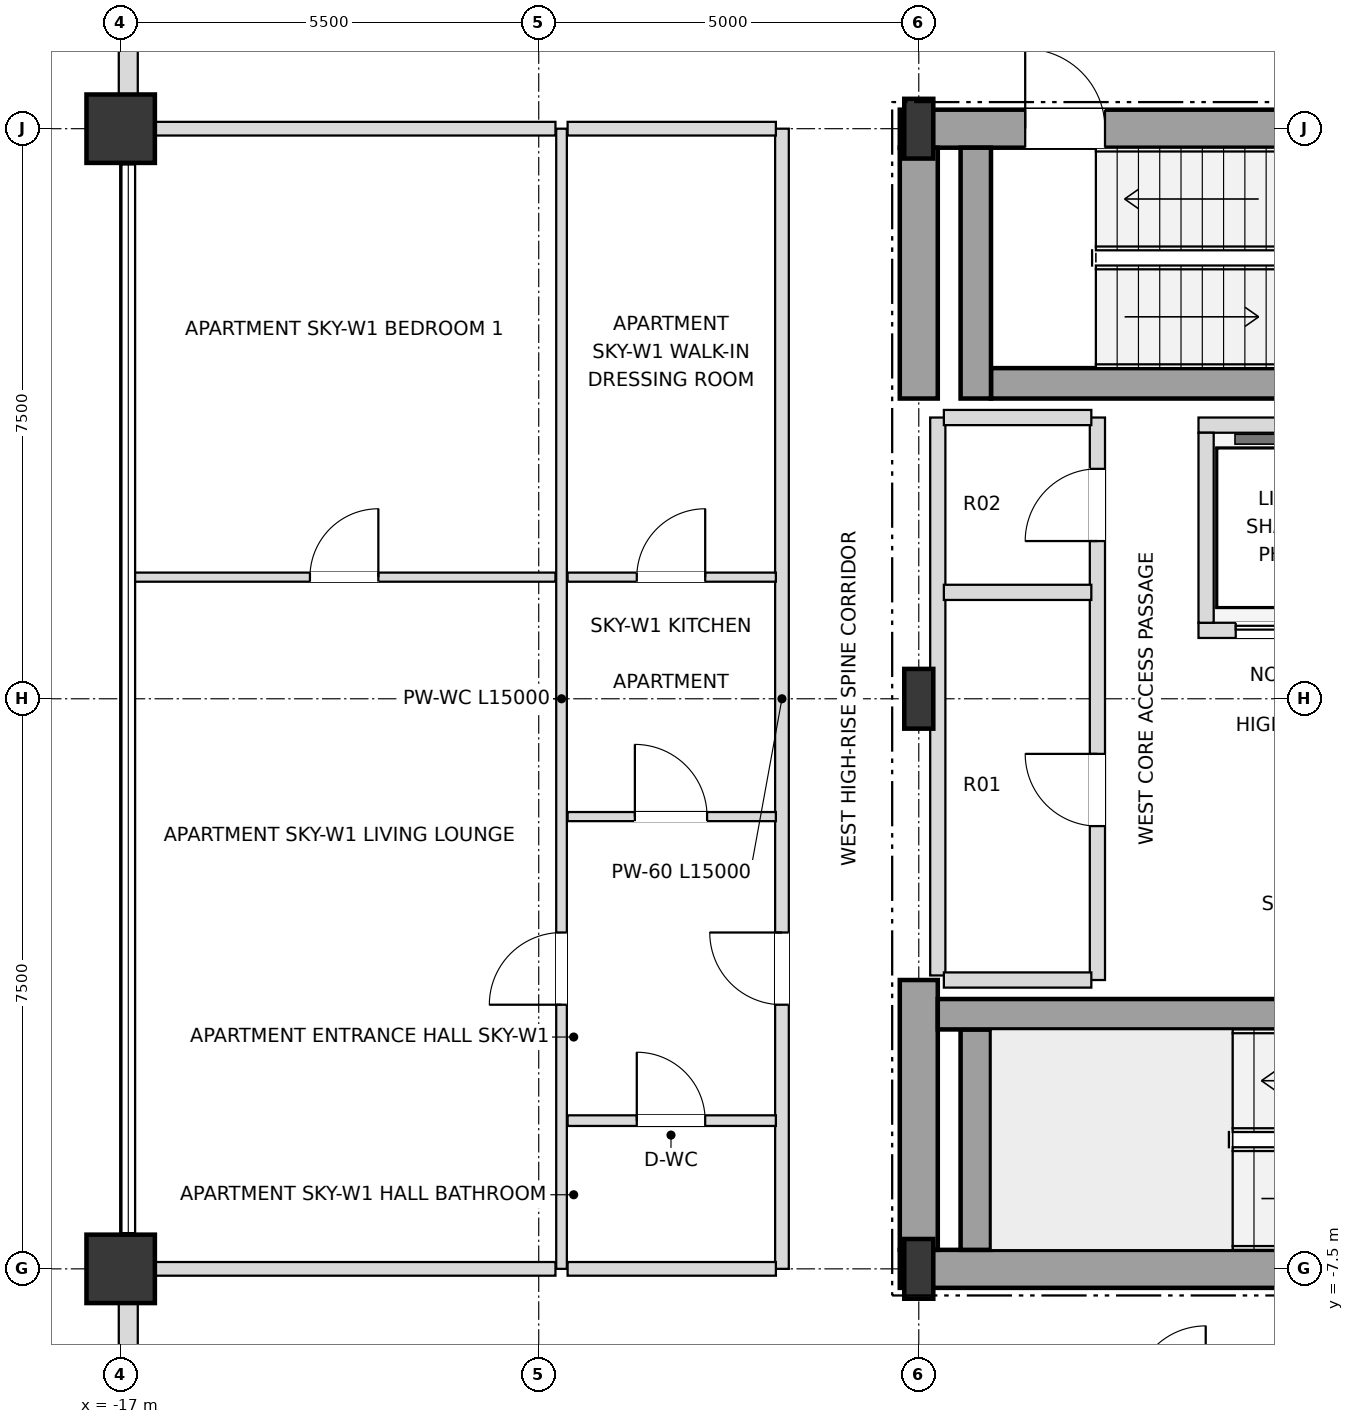
"""IFC4 building model, lengths in metres.
Left out: names, types, materials, properties, quantities, classifications, styles, units other than length and angle.
Written with IfcOpenShell. Run it as: python <this file> out.ifc"""

import sys

from ifc_helpers import new_model, si_unit, direction, frame, frame_2d, origin, origin_2d, place, context, subcontext, project, spatial, rectangle, i_section, extrude, element, fill, save


model = new_model("IFC4")
c1 = context("Model", 3, precision=1e-05, world=origin(), true_north=direction((0.0, 1.0)))
c2 = subcontext(c1, "Body", "Model", "MODEL_VIEW")
j1 = project(units=[si_unit("LENGTHUNIT", "METRE"), si_unit("PLANEANGLEUNIT", "RADIAN")], contexts=[c1])
p1 = place(None, origin())
s1 = spatial("IfcSite", under=j1, at=p1, CompositionType="ELEMENT")
p2 = place(p1, origin())
s2 = spatial("IfcBuilding", under=s1, at=p2, CompositionType="ELEMENT")
p3 = place(p2, frame((0.0, 0.0, 222.3)))
s3 = spatial("IfcBuildingStorey", under=s2, at=p3, CompositionType="ELEMENT", Elevation=222.3)
for number, where, z_axis, x_axis in (
    (1, (-6.5, -7.5, 0.0), (0.0, 0.0, 1.0), (1.0, 0.0, 0.0)),
    (2, (-6.5, 0.0, 0.0), (0.0, 0.0, 1.0), (1.0, 0.0, 0.0)),
    (3, (-6.5, 7.5, 0.0), (0.0, 0.0, 1.0), (1.0, 0.0, 0.0)),
):
    element("IfcColumn", number, at=place(p3, frame(where, z_axis=z_axis, x_axis=x_axis)), inside=s3, PredefinedType="COLUMN", context=c2, shape_type="SweptSolid", body=[
        extrude(i_section(OverallWidth=0.382, OverallDepth=0.786, WebThickness=0.02, FlangeThickness=0.033, at=origin_2d()), origin(), (0.0, 0.0, 1.0), 3.6),
    ])
for number, where, z_axis, x_axis in (
    (4, (-17.0, 7.5, 0.0), (0.0, 0.0, 1.0), (1.0, 0.0, 0.0)),
    (5, (-17.0, -7.5, 0.0), (0.0, 0.0, 1.0), (1.0, 0.0, 0.0)),
):
    element("IfcColumn", number, at=place(p3, frame(where, z_axis=z_axis, x_axis=x_axis)), inside=s3, PredefinedType="USERDEFINED", context=c2, shape_type="SweptSolid", body=[
        extrude(rectangle(XDim=0.9, YDim=0.9, at=origin_2d()), origin(), (0.0, 0.0, 1.0), 3.6),
    ])
p4 = place(p3, frame((-16.9, 12.555, 0.0), z_axis=(0.0, 0.0, 1.0), x_axis=(0.0, -1.0, 0.0)))
e6 = element("IfcWall", 6, at=p4, inside=s3, PredefinedType="SOLIDWALL", context=c2, shape_type="SweptSolid", body=[
    extrude(rectangle(XDim=4.61, YDim=0.25, at=frame_2d((2.305, 0.0))), origin(), (0.0, 0.0, 1.0), 2.748),
])
p5 = place(p4, frame((1.405, 0.0, 0.72)))
e7 = element("IfcOpeningElement", 7, at=p5, cuts=e6, PredefinedType="OPENING", context=c2, shape_type="SweptSolid", body=[
    extrude(rectangle(XDim=1.8, YDim=1.68, at=frame_2d((0.9, 0.84))), frame((0.0, 0.135, 0.0), z_axis=(0.0, -1.0, 0.0), x_axis=(1.0, 0.0, 0.0)), (0.0, 0.0, 1.0), 0.27),
])
p6 = place(p3, frame((-16.9, -7.945, 0.0), z_axis=(0.0, 0.0, 1.0), x_axis=(0.0, -1.0, 0.0)))
e8 = element("IfcWall", 8, at=p6, inside=s3, PredefinedType="SOLIDWALL", context=c2, shape_type="SweptSolid", body=[
    extrude(rectangle(XDim=4.61, YDim=0.25, at=frame_2d((2.305, 0.0))), origin(), (0.0, 0.0, 1.0), 2.748),
])
p7 = place(p6, frame((1.405, 0.0, 0.72)))
e9 = element("IfcOpeningElement", 9, at=p7, cuts=e8, PredefinedType="OPENING", context=c2, shape_type="SweptSolid", body=[
    extrude(rectangle(XDim=1.8, YDim=1.68, at=frame_2d((0.9, 0.84))), frame((0.0, 0.135, 0.0), z_axis=(0.0, -1.0, 0.0), x_axis=(1.0, 0.0, 0.0)), (0.0, 0.0, 1.0), 0.27),
])
p8 = place(p3, frame((-6.75, -7.5, 0.0), z_axis=(0.0, 0.0, 1.0), x_axis=(1.0, 0.0, 0.0)))
e10 = element("IfcWall", 10, at=p8, inside=s3, PredefinedType="SHEAR", context=c2, shape_type="SweptSolid", body=[
    extrude(rectangle(XDim=6.75, YDim=0.5, at=frame_2d((3.375, 0.0))), origin(), (0.0, 0.0, 1.0), 3.38),
])
p9 = place(p3, frame((-6.75, 7.5, 0.0), z_axis=(0.0, 0.0, 1.0), x_axis=(1.0, 0.0, 0.0)))
e11 = element("IfcWall", 11, at=p9, inside=s3, PredefinedType="SHEAR", context=c2, shape_type="SweptSolid", body=[
    extrude(rectangle(XDim=6.75, YDim=0.5, at=frame_2d((3.375, 0.0))), origin(), (0.0, 0.0, 1.0), 3.38),
])
p10 = place(p9, frame((1.65, 0.0, 0.0)))
e12 = element("IfcOpeningElement", 12, at=p10, cuts=e11, PredefinedType="OPENING", context=c2, shape_type="SweptSolid", body=[
    extrude(rectangle(XDim=1.05, YDim=2.15, at=frame_2d((0.525, 1.075))), frame((0.0, 0.26, 0.0), z_axis=(0.0, -1.0, 0.0), x_axis=(1.0, 0.0, 0.0)), (0.0, 0.0, 1.0), 0.52),
])
p11 = place(p3, frame((-6.5, -7.25, 0.0), z_axis=(0.0, 0.0, 1.0), x_axis=(0.0, 1.0, 0.0)))
e13 = element("IfcWall", 13, at=p11, inside=s3, PredefinedType="SHEAR", context=c2, shape_type="SweptSolid", body=[
    extrude(rectangle(XDim=3.55, YDim=0.5, at=frame_2d((1.775, 0.0))), origin(), (0.0, 0.0, 1.0), 3.38),
])
p12 = place(p3, frame((-6.5, 3.95, 0.0), z_axis=(0.0, 0.0, 1.0), x_axis=(0.0, 1.0, 0.0)))
e14 = element("IfcWall", 14, at=p12, inside=s3, PredefinedType="SHEAR", context=c2, shape_type="SweptSolid", body=[
    extrude(rectangle(XDim=3.3, YDim=0.5, at=frame_2d((1.65, 0.0))), origin(), (0.0, 0.0, 1.0), 3.38),
])
p13 = place(p3, frame((-5.75, -7.25, 0.0), z_axis=(0.0, 0.0, 1.0), x_axis=(0.0, 1.0, 0.0)))
e15 = element("IfcWall", 15, at=p13, inside=s3, PredefinedType="SHEAR", context=c2, shape_type="SweptSolid", body=[
    extrude(rectangle(XDim=2.9, YDim=0.4, at=frame_2d((1.45, 0.0))), origin(), (0.0, 0.0, 1.0), 3.38),
])
p14 = place(p3, frame((-6.25, -4.15, 0.0), z_axis=(0.0, 0.0, 1.0), x_axis=(1.0, 0.0, 0.0)))
e16 = element("IfcWall", 16, at=p14, inside=s3, PredefinedType="SHEAR", context=c2, shape_type="SweptSolid", body=[
    extrude(rectangle(XDim=7.78, YDim=0.4, at=frame_2d((3.89, 0.0))), origin(), (0.0, 0.0, 1.0), 3.38),
])
p15 = place(p3, frame((-5.55, 4.15, 0.0), z_axis=(0.0, 0.0, 1.0), x_axis=(1.0, 0.0, 0.0)))
e17 = element("IfcWall", 17, at=p15, inside=s3, PredefinedType="SHEAR", context=c2, shape_type="SweptSolid", body=[
    extrude(rectangle(XDim=7.08, YDim=0.4, at=frame_2d((3.54, 0.0))), origin(), (0.0, 0.0, 1.0), 3.38),
])
p16 = place(p3, frame((-5.75, 3.95, 0.0), z_axis=(0.0, 0.0, 1.0), x_axis=(0.0, 1.0, 0.0)))
e18 = element("IfcWall", 18, at=p16, inside=s3, PredefinedType="SHEAR", context=c2, shape_type="SweptSolid", body=[
    extrude(rectangle(XDim=3.3, YDim=0.4, at=frame_2d((1.65, 0.0))), origin(), (0.0, 0.0, 1.0), 3.38),
])
p17 = place(p3, frame((-2.82, 0.9, 0.0), z_axis=(0.0, 0.0, 1.0), x_axis=(1.0, 0.0, 0.0)))
e19 = element("IfcWall", 19, at=p17, inside=s3, PredefinedType="SOLIDWALL", context=c2, shape_type="SweptSolid", body=[
    extrude(rectangle(XDim=5.58, YDim=0.2, at=frame_2d((2.79, 0.0))), origin(), (0.0, 0.0, 1.0), 3.38),
])
p18 = place(p17, frame((0.49, 0.0, 0.0)))
e20 = element("IfcOpeningElement", 20, at=p18, cuts=e19, PredefinedType="OPENING", context=c2, shape_type="SweptSolid", body=[
    extrude(rectangle(XDim=1.1, YDim=2.15, at=frame_2d((0.55, 1.075))), frame((0.0, 0.11, 0.0), z_axis=(0.0, -1.0, 0.0), x_axis=(1.0, 0.0, 0.0)), (0.0, 0.0, 1.0), 0.22),
])
p19 = place(p17, frame((2.17, 0.0, 0.0)))
e21 = element("IfcOpeningElement", 21, at=p19, cuts=e19, PredefinedType="OPENING", context=c2, shape_type="SweptSolid", body=[
    extrude(rectangle(XDim=1.1, YDim=2.15, at=frame_2d((0.55, 1.075))), frame((0.0, 0.11, 0.0), z_axis=(0.0, -1.0, 0.0), x_axis=(1.0, 0.0, 0.0)), (0.0, 0.0, 1.0), 0.22),
])
p20 = place(p17, frame((3.86, 0.0, 0.0)))
e22 = element("IfcOpeningElement", 22, at=p20, cuts=e19, PredefinedType="OPENING", context=c2, shape_type="SweptSolid", body=[
    extrude(rectangle(XDim=1.2, YDim=2.2, at=frame_2d((0.6, 1.1))), frame((0.0, 0.11, 0.0), z_axis=(0.0, -1.0, 0.0), x_axis=(1.0, 0.0, 0.0)), (0.0, 0.0, 1.0), 0.22),
])
p21 = place(p3, frame((-2.82, 3.6, 0.0), z_axis=(0.0, 0.0, 1.0), x_axis=(1.0, 0.0, 0.0)))
e23 = element("IfcWall", 23, at=p21, inside=s3, PredefinedType="SOLIDWALL", context=c2, shape_type="SweptSolid", body=[
    extrude(rectangle(XDim=5.58, YDim=0.2, at=frame_2d((2.79, 0.0))), origin(), (0.0, 0.0, 1.0), 3.38),
])
p22 = place(p3, frame((-2.72, 1.0, 0.0), z_axis=(0.0, 0.0, 1.0), x_axis=(0.0, 1.0, 0.0)))
e24 = element("IfcWall", 24, at=p22, inside=s3, PredefinedType="SOLIDWALL", context=c2, shape_type="SweptSolid", body=[
    extrude(rectangle(XDim=2.5, YDim=0.2, at=frame_2d((1.25, 0.0))), origin(), (0.0, 0.0, 1.0), 3.38),
])
p23 = place(p3, frame((-11.2, -7.5, 0.0), z_axis=(0.0, 0.0, 1.0), x_axis=(0.0, 1.0, 0.0)))
e25 = element("IfcWall", 25, at=p23, inside=s3, PredefinedType="PARTITIONING", context=c2, shape_type="SweptSolid", body=[
    extrude(rectangle(XDim=15.0, YDim=0.14, at=frame_2d((7.5, 0.0))), origin(), (0.0, 0.0, 1.0), 3.38),
])
p24 = place(p23, frame((3.475, 0.0, 0.0)))
e26 = element("IfcOpeningElement", 26, at=p24, cuts=e25, PredefinedType="OPENING", context=c2, shape_type="SweptSolid", body=[
    extrude(rectangle(XDim=0.95, YDim=2.1, at=frame_2d((0.475, 1.05))), frame((0.0, 0.08, 0.0), z_axis=(0.0, -1.0, 0.0), x_axis=(1.0, 0.0, 0.0)), (0.0, 0.0, 1.0), 0.16),
])
p25 = place(p3, frame((-8.3, -7.5, 0.0), z_axis=(0.0, 0.0, 1.0), x_axis=(0.0, 1.0, 0.0)))
e27 = element("IfcWall", 27, at=p25, inside=s3, PredefinedType="PARTITIONING", context=c2, shape_type="SweptSolid", body=[
    extrude(rectangle(XDim=15.0, YDim=0.18, at=frame_2d((7.5, 0.0))), origin(), (0.0, 0.0, 1.0), 3.38),
])
p26 = place(p25, frame((3.475, 0.0, 0.0)))
e28 = element("IfcOpeningElement", 28, at=p26, cuts=e27, PredefinedType="OPENING", context=c2, shape_type="SweptSolid", body=[
    extrude(rectangle(XDim=0.95, YDim=2.15, at=frame_2d((0.475, 1.075))), frame((0.0, 0.1, 0.0), z_axis=(0.0, -1.0, 0.0), x_axis=(1.0, 0.0, 0.0)), (0.0, 0.0, 1.0), 0.2),
])
p27 = place(p3, frame((-6.25, -3.64, 0.0), z_axis=(0.0, 0.0, 1.0), x_axis=(0.0, 1.0, 0.0)))
e29 = element("IfcWall", 29, at=p27, inside=s3, PredefinedType="SOLIDWALL", context=c2, shape_type="SweptSolid", body=[
    extrude(rectangle(XDim=7.34, YDim=0.2, at=frame_2d((3.67, 0.0))), origin(), (0.0, 0.0, 1.0), 3.38),
])
p28 = place(p3, frame((-4.15, -3.7, 0.0), z_axis=(0.0, 0.0, 1.0), x_axis=(0.0, 1.0, 0.0)))
e30 = element("IfcWall", 30, at=p28, inside=s3, PredefinedType="SOLIDWALL", context=c2, shape_type="SweptSolid", body=[
    extrude(rectangle(XDim=7.4, YDim=0.2, at=frame_2d((3.7, 0.0))), origin(), (0.0, 0.0, 1.0), 3.38),
])
p29 = place(p28, frame((2.025, 0.0, 0.0)))
e31 = element("IfcOpeningElement", 31, at=p29, cuts=e30, PredefinedType="OPENING", context=c2, shape_type="SweptSolid", body=[
    extrude(rectangle(XDim=0.95, YDim=2.15, at=frame_2d((0.475, 1.075))), frame((0.0, 0.11, 0.0), z_axis=(0.0, -1.0, 0.0), x_axis=(1.0, 0.0, 0.0)), (0.0, 0.0, 1.0), 0.22),
])
p30 = place(p28, frame((5.775, 0.0, 0.0)))
e32 = element("IfcOpeningElement", 32, at=p30, cuts=e30, PredefinedType="OPENING", context=c2, shape_type="SweptSolid", body=[
    extrude(rectangle(XDim=0.95, YDim=2.15, at=frame_2d((0.475, 1.075))), frame((0.0, 0.11, 0.0), z_axis=(0.0, -1.0, 0.0), x_axis=(1.0, 0.0, 0.0)), (0.0, 0.0, 1.0), 0.22),
])
p31 = place(p3, frame((-16.9, -7.5, 0.0), z_axis=(0.0, 0.0, 1.0), x_axis=(1.0, 0.0, 0.0)))
e33 = element("IfcWall", 33, at=p31, inside=s3, PredefinedType="PARTITIONING", context=c2, shape_type="SweptSolid", body=[
    extrude(rectangle(XDim=5.62, YDim=0.18, at=frame_2d((2.81, 0.0))), origin(), (0.0, 0.0, 1.0), 2.826),
])
p32 = place(p3, frame((-11.12, -7.5, 0.0), z_axis=(0.0, 0.0, 1.0), x_axis=(1.0, 0.0, 0.0)))
e34 = element("IfcWall", 34, at=p32, inside=s3, PredefinedType="PARTITIONING", context=c2, shape_type="SweptSolid", body=[
    extrude(rectangle(XDim=2.74, YDim=0.18, at=frame_2d((1.37, 0.0))), origin(), (0.0, 0.0, 1.0), 2.826),
])
p33 = place(p3, frame((-11.12, -5.55, 0.0), z_axis=(0.0, 0.0, 1.0), x_axis=(1.0, 0.0, 0.0)))
e35 = element("IfcWall", 35, at=p33, inside=s3, PredefinedType="PARTITIONING", context=c2, shape_type="SweptSolid", body=[
    extrude(rectangle(XDim=2.74, YDim=0.14, at=frame_2d((1.37, 0.0))), origin(), (0.0, 0.0, 1.0), 3.38),
])
p34 = place(p33, frame((0.91, 0.0, 0.0)))
e36 = element("IfcOpeningElement", 36, at=p34, cuts=e35, PredefinedType="OPENING", context=c2, shape_type="SweptSolid", body=[
    extrude(rectangle(XDim=0.9, YDim=2.1, at=frame_2d((0.45, 1.05))), frame((0.0, 0.08, 0.0), z_axis=(0.0, -1.0, 0.0), x_axis=(1.0, 0.0, 0.0)), (0.0, 0.0, 1.0), 0.16),
])
p35 = place(p3, frame((-6.17, -3.7, 0.0), z_axis=(0.0, 0.0, 1.0), x_axis=(1.0, 0.0, 0.0)))
e37 = element("IfcWall", 37, at=p35, inside=s3, PredefinedType="SOLIDWALL", context=c2, shape_type="SweptSolid", body=[
    extrude(rectangle(XDim=1.94, YDim=0.2, at=frame_2d((0.97, 0.0))), origin(), (0.0, 0.0, 1.0), 3.38),
])
p36 = place(p3, frame((-11.12, -1.55, 0.0), z_axis=(0.0, 0.0, 1.0), x_axis=(1.0, 0.0, 0.0)))
e38 = element("IfcWall", 38, at=p36, inside=s3, PredefinedType="PARTITIONING", context=c2, shape_type="SweptSolid", body=[
    extrude(rectangle(XDim=2.74, YDim=0.12, at=frame_2d((1.37, 0.0))), origin(), (0.0, 0.0, 1.0), 3.38),
])
p37 = place(p36, frame((0.885, 0.0, 0.0)))
e39 = element("IfcOpeningElement", 39, at=p37, cuts=e38, PredefinedType="OPENING", context=c2, shape_type="SweptSolid", body=[
    extrude(rectangle(XDim=0.95, YDim=2.1, at=frame_2d((0.475, 1.05))), frame((0.0, 0.07, 0.0), z_axis=(0.0, -1.0, 0.0), x_axis=(1.0, 0.0, 0.0)), (0.0, 0.0, 1.0), 0.14),
])
p38 = place(p3, frame((-6.17, 1.4, 0.0), z_axis=(0.0, 0.0, 1.0), x_axis=(1.0, 0.0, 0.0)))
e40 = element("IfcWall", 40, at=p38, inside=s3, PredefinedType="SOLIDWALL", context=c2, shape_type="SweptSolid", body=[
    extrude(rectangle(XDim=1.94, YDim=0.2, at=frame_2d((0.97, 0.0))), origin(), (0.0, 0.0, 1.0), 3.38),
])
p39 = place(p3, frame((-16.82, 1.6, 0.0), z_axis=(0.0, 0.0, 1.0), x_axis=(1.0, 0.0, 0.0)))
e41 = element("IfcWall", 41, at=p39, inside=s3, PredefinedType="PARTITIONING", context=c2, shape_type="SweptSolid", body=[
    extrude(rectangle(XDim=5.54, YDim=0.12, at=frame_2d((2.77, 0.0))), origin(), (0.0, 0.0, 1.0), 3.018),
])
p40 = place(p39, frame((2.31, 0.0, 0.0)))
e42 = element("IfcOpeningElement", 42, at=p40, cuts=e41, PredefinedType="OPENING", context=c2, shape_type="SweptSolid", body=[
    extrude(rectangle(XDim=0.9, YDim=2.1, at=frame_2d((0.45, 1.05))), frame((0.0, 0.07, 0.0), z_axis=(0.0, -1.0, 0.0), x_axis=(1.0, 0.0, 0.0)), (0.0, 0.0, 1.0), 0.14),
])
p41 = place(p3, frame((-11.12, 1.6, 0.0), z_axis=(0.0, 0.0, 1.0), x_axis=(1.0, 0.0, 0.0)))
e43 = element("IfcWall", 43, at=p41, inside=s3, PredefinedType="PARTITIONING", context=c2, shape_type="SweptSolid", body=[
    extrude(rectangle(XDim=2.74, YDim=0.12, at=frame_2d((1.37, 0.0))), origin(), (0.0, 0.0, 1.0), 3.38),
])
p42 = place(p41, frame((0.91, 0.0, 0.0)))
e44 = element("IfcOpeningElement", 44, at=p42, cuts=e43, PredefinedType="OPENING", context=c2, shape_type="SweptSolid", body=[
    extrude(rectangle(XDim=0.9, YDim=2.1, at=frame_2d((0.45, 1.05))), frame((0.0, 0.07, 0.0), z_axis=(0.0, -1.0, 0.0), x_axis=(1.0, 0.0, 0.0)), (0.0, 0.0, 1.0), 0.14),
])
p43 = place(p3, frame((-6.17, 3.7, 0.0), z_axis=(0.0, 0.0, 1.0), x_axis=(1.0, 0.0, 0.0)))
e45 = element("IfcWall", 45, at=p43, inside=s3, PredefinedType="SOLIDWALL", context=c2, shape_type="SweptSolid", body=[
    extrude(rectangle(XDim=1.94, YDim=0.2, at=frame_2d((0.97, 0.0))), origin(), (0.0, 0.0, 1.0), 3.38),
])
p44 = place(p3, frame((-16.9, 7.5, 0.0), z_axis=(0.0, 0.0, 1.0), x_axis=(1.0, 0.0, 0.0)))
e46 = element("IfcWall", 46, at=p44, inside=s3, PredefinedType="PARTITIONING", context=c2, shape_type="SweptSolid", body=[
    extrude(rectangle(XDim=5.62, YDim=0.18, at=frame_2d((2.81, 0.0))), origin(), (0.0, 0.0, 1.0), 2.826),
])
p45 = place(p3, frame((-11.12, 7.5, 0.0), z_axis=(0.0, 0.0, 1.0), x_axis=(1.0, 0.0, 0.0)))
e47 = element("IfcWall", 47, at=p45, inside=s3, PredefinedType="PARTITIONING", context=c2, shape_type="SweptSolid", body=[
    extrude(rectangle(XDim=2.74, YDim=0.18, at=frame_2d((1.37, 0.0))), origin(), (0.0, 0.0, 1.0), 2.826),
])
p46 = place(p10, origin())
e48 = element("IfcDoor", 48, at=p46, inside=s3, OperationType="SINGLE_SWING_LEFT", PredefinedType="DOOR", context=c2, shape_type="SweptSolid", body=[
    extrude(rectangle(XDim=1.05, YDim=2.15, at=frame_2d((0.525, 1.075))), frame((0.0, 0.025, 0.0), z_axis=(0.0, -1.0, 0.0), x_axis=(1.0, 0.0, 0.0)), (0.0, 0.0, 1.0), 0.05),
])
fill(e12, e48)
p47 = place(p18, origin())
e49 = element("IfcDoor", 49, at=p47, inside=s3, OperationType="DOUBLE_DOOR_SLIDING", PredefinedType="DOOR", context=c2, shape_type="SweptSolid", body=[
    extrude(rectangle(XDim=1.1, YDim=2.15, at=frame_2d((0.55, 1.075))), frame((0.0, 0.025, 0.0), z_axis=(0.0, -1.0, 0.0), x_axis=(1.0, 0.0, 0.0)), (0.0, 0.0, 1.0), 0.05),
])
fill(e20, e49)
p48 = place(p29, origin())
e50 = element("IfcDoor", 50, at=p48, inside=s3, OperationType="SINGLE_SWING_RIGHT", PredefinedType="DOOR", context=c2, shape_type="SweptSolid", body=[
    extrude(rectangle(XDim=0.95, YDim=2.15, at=frame_2d((0.475, 1.075))), frame((0.0, 0.025, 0.0), z_axis=(0.0, -1.0, 0.0), x_axis=(1.0, 0.0, 0.0)), (0.0, 0.0, 1.0), 0.05),
])
fill(e31, e50)
p49 = place(p30, origin())
e51 = element("IfcDoor", 51, at=p49, inside=s3, OperationType="SINGLE_SWING_LEFT", PredefinedType="DOOR", context=c2, shape_type="SweptSolid", body=[
    extrude(rectangle(XDim=0.95, YDim=2.15, at=frame_2d((0.475, 1.075))), frame((0.0, 0.025, 0.0), z_axis=(0.0, -1.0, 0.0), x_axis=(1.0, 0.0, 0.0)), (0.0, 0.0, 1.0), 0.05),
])
fill(e32, e51)
p50 = place(p34, origin())
e52 = element("IfcDoor", 52, at=p50, inside=s3, OperationType="SINGLE_SWING_LEFT", PredefinedType="DOOR", context=c2, shape_type="SweptSolid", body=[
    extrude(rectangle(XDim=0.9, YDim=2.1, at=frame_2d((0.45, 1.05))), frame((0.0, 0.025, 0.0), z_axis=(0.0, -1.0, 0.0), x_axis=(1.0, 0.0, 0.0)), (0.0, 0.0, 1.0), 0.05),
])
fill(e36, e52)
p51 = place(p26, origin())
e53 = element("IfcDoor", 53, at=p51, inside=s3, OperationType="SINGLE_SWING_RIGHT", PredefinedType="DOOR", context=c2, shape_type="SweptSolid", body=[
    extrude(rectangle(XDim=0.95, YDim=2.15, at=frame_2d((0.475, 1.075))), frame((0.0, 0.025, 0.0), z_axis=(0.0, -1.0, 0.0), x_axis=(1.0, 0.0, 0.0)), (0.0, 0.0, 1.0), 0.05),
])
fill(e28, e53)
p52 = place(p37, origin())
e54 = element("IfcDoor", 54, at=p52, inside=s3, OperationType="SINGLE_SWING_LEFT", PredefinedType="DOOR", context=c2, shape_type="SweptSolid", body=[
    extrude(rectangle(XDim=0.95, YDim=2.1, at=frame_2d((0.475, 1.05))), frame((0.0, 0.025, 0.0), z_axis=(0.0, -1.0, 0.0), x_axis=(1.0, 0.0, 0.0)), (0.0, 0.0, 1.0), 0.05),
])
fill(e39, e54)
p53 = place(p42, origin())
e55 = element("IfcDoor", 55, at=p53, inside=s3, OperationType="SINGLE_SWING_RIGHT", PredefinedType="DOOR", context=c2, shape_type="SweptSolid", body=[
    extrude(rectangle(XDim=0.9, YDim=2.1, at=frame_2d((0.45, 1.05))), frame((0.0, 0.025, 0.0), z_axis=(0.0, -1.0, 0.0), x_axis=(1.0, 0.0, 0.0)), (0.0, 0.0, 1.0), 0.05),
])
fill(e44, e55)
p54 = place(p24, origin())
e56 = element("IfcDoor", 56, at=p54, inside=s3, OperationType="SINGLE_SWING_LEFT", PredefinedType="DOOR", context=c2, shape_type="SweptSolid", body=[
    extrude(rectangle(XDim=0.95, YDim=2.1, at=frame_2d((0.475, 1.05))), frame((0.0, 0.025, 0.0), z_axis=(0.0, -1.0, 0.0), x_axis=(1.0, 0.0, 0.0)), (0.0, 0.0, 1.0), 0.05),
])
fill(e26, e56)
p55 = place(p40, origin())
e57 = element("IfcDoor", 57, at=p55, inside=s3, OperationType="SINGLE_SWING_RIGHT", PredefinedType="DOOR", context=c2, shape_type="SweptSolid", body=[
    extrude(rectangle(XDim=0.9, YDim=2.1, at=frame_2d((0.45, 1.05))), frame((0.0, 0.025, 0.0), z_axis=(0.0, -1.0, 0.0), x_axis=(1.0, 0.0, 0.0)), (0.0, 0.0, 1.0), 0.05),
])
fill(e42, e57)
save(model, sys.argv[1])
